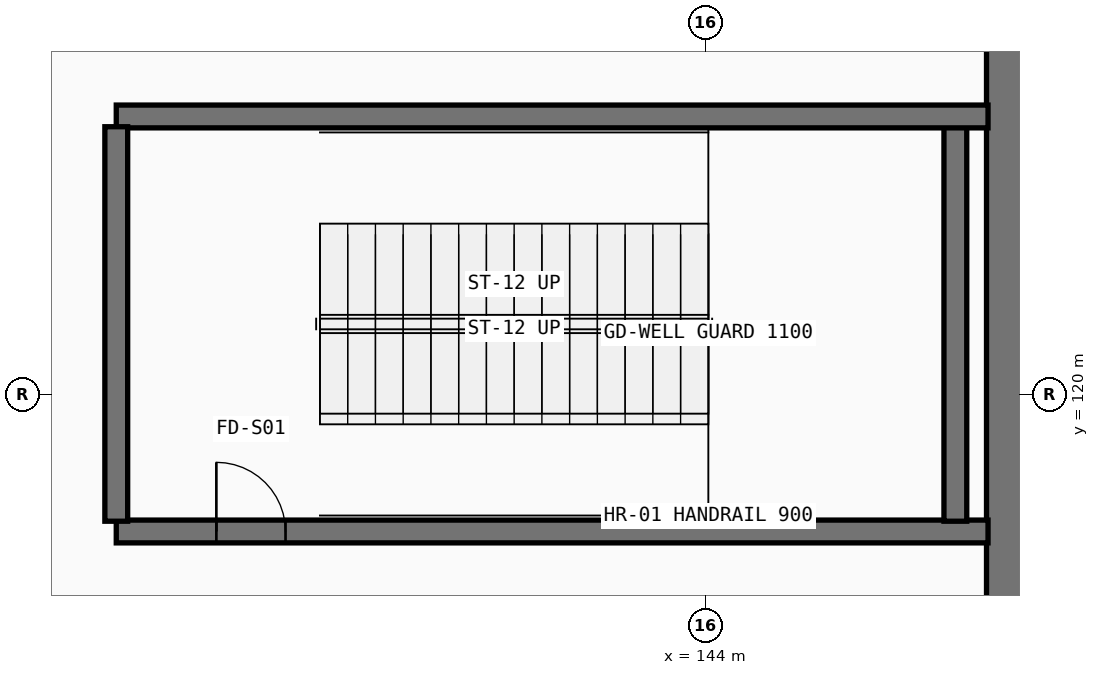
"""IFC4 building model, lengths in metres.
Left out: names, types, materials, properties, quantities, classifications, styles, units other than length and angle.
Written with IfcOpenShell. Run it as: python <this file> out.ifc"""

import sys

from ifc_helpers import new_model, si_unit, direction, frame, frame_2d, origin, place, context, subcontext, project, spatial, rectangle, extrude, element, fill, save


model = new_model("IFC4")
c1 = context("Model", 3, precision=1e-05, world=origin(), true_north=direction((0.0, 1.0)))
c2 = subcontext(c1, "Body", "Model", "MODEL_VIEW")
j1 = project(units=[si_unit("LENGTHUNIT", "METRE"), si_unit("PLANEANGLEUNIT", "RADIAN")], contexts=[c1])
p1 = place(None, origin())
s1 = spatial("IfcSite", under=j1, at=p1, CompositionType="ELEMENT")
p2 = place(p1, origin())
s2 = spatial("IfcBuilding", under=s1, at=p2, CompositionType="ELEMENT")
p3 = place(p2, frame((0.0, 0.0, -5.4)))
s3 = spatial("IfcBuildingStorey", under=s2, at=p3, CompositionType="ELEMENT", Elevation=-5.4)
p4 = place(p3, frame((148.0, 125.765, 0.0), z_axis=(0.0, 0.0, 1.0), x_axis=(0.0, -1.0, 0.0)))
e1 = element("IfcWall", 1, at=p4, inside=s3, PredefinedType="SHEAR", context=c2, shape_type="SweptSolid", body=[
    extrude(rectangle(XDim=13.765, YDim=0.6, at=frame_2d((6.882, 0.0))), origin(), (0.0, 0.0, 1.0), 5.06),
])
p5 = place(p3, frame((136.25, 118.2, 0.0), z_axis=(0.0, 0.0, 1.0), x_axis=(1.0, 0.0, 0.0)))
e2 = element("IfcWall", 2, at=p5, inside=s3, PredefinedType="SHEAR", context=c2, shape_type="SweptSolid", body=[
    extrude(rectangle(XDim=11.47, YDim=0.3, at=frame_2d((5.735, 0.0))), origin(), (0.0, 0.0, 1.0), 5.06),
])
p6 = place(p5, frame((1.317, 0.0, 0.0)))
e3 = element("IfcOpeningElement", 3, at=p6, cuts=e2, PredefinedType="OPENING", context=c2, shape_type="SweptSolid", body=[
    extrude(rectangle(XDim=0.91, YDim=2.08, at=frame_2d((0.455, 1.04))), frame((0.0, 0.16, 0.0), z_axis=(0.0, -1.0, 0.0), x_axis=(1.0, 0.0, 0.0)), (0.0, 0.0, 1.0), 0.32),
])
p7 = place(p3, frame((147.29, 118.335, 0.0), z_axis=(0.0, 0.0, 1.0), x_axis=(0.0, 1.0, 0.0)))
e4 = element("IfcWall", 4, at=p7, inside=s3, PredefinedType="SHEAR", context=c2, shape_type="SweptSolid", body=[
    extrude(rectangle(XDim=5.325, YDim=0.3, at=frame_2d((2.663, 0.0))), origin(), (0.0, 0.0, 1.0), 5.06),
])
p8 = place(p3, frame((147.72, 123.66, 0.0), z_axis=(0.0, 0.0, 1.0), x_axis=(-1.0, 0.0, 0.0)))
e5 = element("IfcWall", 5, at=p8, inside=s3, PredefinedType="SHEAR", context=c2, shape_type="SweptSolid", body=[
    extrude(rectangle(XDim=11.47, YDim=0.3, at=frame_2d((5.735, 0.0))), origin(), (0.0, 0.0, 1.0), 5.06),
])
p9 = place(p3, frame((136.25, 123.525, 0.0), z_axis=(0.0, 0.0, 1.0), x_axis=(0.0, -1.0, 0.0)))
e6 = element("IfcWall", 6, at=p9, inside=s3, PredefinedType="SHEAR", context=c2, shape_type="SweptSolid", body=[
    extrude(rectangle(XDim=5.19, YDim=0.3, at=frame_2d((2.595, 0.0))), origin(), (0.0, 0.0, 1.0), 5.06),
])
p10 = place(p6, origin())
e7 = element("IfcDoor", 7, at=p10, inside=s3, OperationType="SINGLE_SWING_RIGHT", PredefinedType="DOOR", context=c2, shape_type="SweptSolid", body=[
    extrude(rectangle(XDim=0.91, YDim=2.08, at=frame_2d((0.455, 1.04))), frame((0.0, 0.025, 0.0), z_axis=(0.0, -1.0, 0.0), x_axis=(1.0, 0.0, 0.0)), (0.0, 0.0, 1.0), 0.05),
])
fill(e3, e7)
save(model, sys.argv[1])
